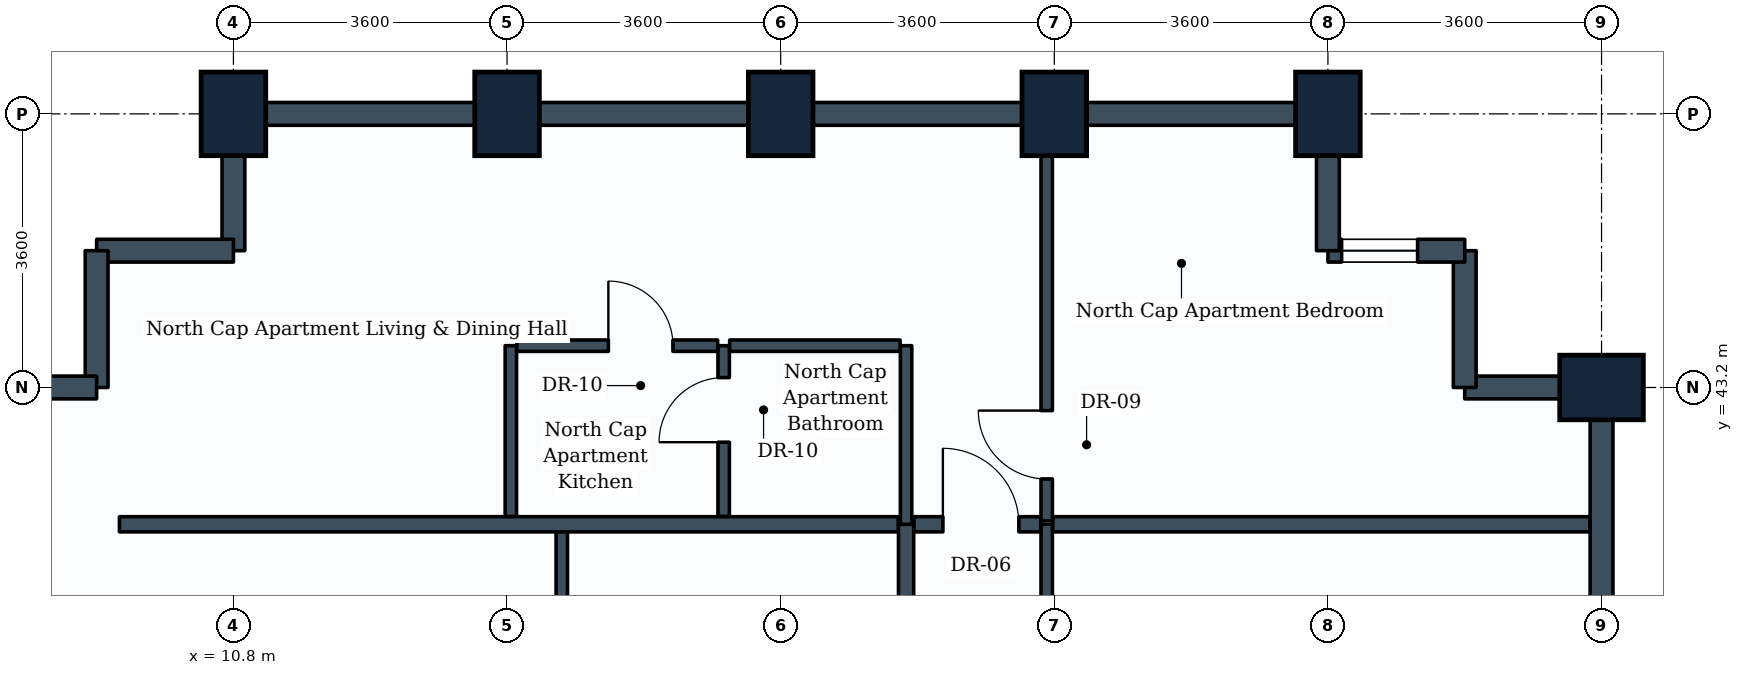
"""IFC4 building model, lengths in metres.
Left out: names, types, materials, properties, quantities, classifications, styles, units other than length and angle.
Written with IfcOpenShell. Run it as: python <this file> out.ifc"""

import sys

from ifc_helpers import new_model, si_unit, direction, frame, frame_2d, origin, origin_2d, place, context, subcontext, project, spatial, rectangle, extrude, element, fill, save


model = new_model("IFC4")
c1 = context("Model", 3, precision=1e-05, world=origin(), true_north=direction((0.0, 1.0)))
c2 = subcontext(c1, "Body", "Model", "MODEL_VIEW")
j1 = project(units=[si_unit("LENGTHUNIT", "METRE"), si_unit("PLANEANGLEUNIT", "RADIAN")], contexts=[c1])
p1 = place(None, origin())
s1 = spatial("IfcSite", under=j1, at=p1, CompositionType="ELEMENT")
p2 = place(p1, origin())
s2 = spatial("IfcBuilding", under=s1, at=p2, CompositionType="ELEMENT")
p3 = place(p2, frame((0.0, 0.0, 123.8)))
s3 = spatial("IfcBuildingStorey", under=s2, at=p3, CompositionType="ELEMENT", Elevation=123.8)
for number, where, z_axis, x_axis in (
    (1, (10.8, 46.8, 0.0), (0.0, 0.0, 1.0), (1.0, 0.0, 0.0)),
    (2, (14.4, 46.8, 0.0), (0.0, 0.0, 1.0), (1.0, 0.0, 0.0)),
    (3, (18.0, 46.8, 0.0), (0.0, 0.0, 1.0), (1.0, 0.0, 0.0)),
    (4, (21.6, 46.8, 0.0), (0.0, 0.0, 1.0), (1.0, 0.0, 0.0)),
    (5, (25.2, 46.8, 0.0), (0.0, 0.0, 1.0), (1.0, 0.0, 0.0)),
    (6, (28.8, 43.2, 0.0), (0.0, 0.0, 1.0), (0.0, 1.0, 0.0)),
):
    element("IfcColumn", number, at=place(p3, frame(where, z_axis=z_axis, x_axis=x_axis)), inside=s3, PredefinedType="COLUMN", context=c2, shape_type="SweptSolid", body=[
        extrude(rectangle(XDim=0.85, YDim=1.1, at=origin_2d()), origin(), (0.0, 0.0, 1.0), 3.8),
    ])
p4 = place(p3, frame((28.8, 43.2, 0.0), z_axis=(0.0, 0.0, 1.0), x_axis=(0.0, -1.0, 0.0)))
e7 = element("IfcWall", 7, at=p4, inside=s3, PredefinedType="STANDARD", context=c2, shape_type="SweptSolid", body=[
    extrude(rectangle(XDim=3.6, YDim=0.3, at=frame_2d((1.8, 0.0))), origin(), (0.0, 0.0, 1.0), 2.43),
])
for number, where, z_axis, x_axis in (
    (8, (27.0, 43.2, 0.0), (0.0, 0.0, 1.0), (1.0, 0.0, 0.0)),
    (9, (27.0, 43.2, 0.0), (0.0, 0.0, 1.0), (0.0, 1.0, 0.0)),
):
    element("IfcWall", number, at=place(p3, frame(where, z_axis=z_axis, x_axis=x_axis)), inside=s3, PredefinedType="STANDARD", context=c2, shape_type="SweptSolid", body=[
        extrude(rectangle(XDim=1.8, YDim=0.3, at=frame_2d((0.9, 0.0))), origin(), (0.0, 0.0, 1.0), 2.43),
    ])
p5 = place(p3, frame((25.2, 45.0, 0.0), z_axis=(0.0, 0.0, 1.0), x_axis=(1.0, 0.0, 0.0)))
e10 = element("IfcWall", 10, at=p5, inside=s3, PredefinedType="STANDARD", context=c2, shape_type="SweptSolid", body=[
    extrude(rectangle(XDim=1.8, YDim=0.3, at=frame_2d((0.9, 0.0))), origin(), (0.0, 0.0, 1.0), 3.465),
])
p6 = place(p5, frame((0.18, 0.0, 0.85)))
e11 = element("IfcOpeningElement", 11, at=p6, cuts=e10, PredefinedType="OPENING", context=c2, shape_type="SweptSolid", body=[
    extrude(rectangle(XDim=1.0, YDim=1.35, at=frame_2d((0.5, 0.675))), frame((0.0, 0.16, 0.0), z_axis=(0.0, -1.0, 0.0), x_axis=(1.0, 0.0, 0.0)), (0.0, 0.0, 1.0), 0.32),
])
p7 = place(p3, frame((25.2, 45.0, 0.0), z_axis=(0.0, 0.0, 1.0), x_axis=(0.0, 1.0, 0.0)))
e12 = element("IfcWall", 12, at=p7, inside=s3, PredefinedType="STANDARD", context=c2, shape_type="SweptSolid", body=[
    extrude(rectangle(XDim=1.8, YDim=0.3, at=frame_2d((0.9, 0.0))), origin(), (0.0, 0.0, 1.0), 2.43),
])
p8 = place(p3, frame((21.6, 46.8, 0.0), z_axis=(0.0, 0.0, 1.0), x_axis=(1.0, 0.0, 0.0)))
e13 = element("IfcWall", 13, at=p8, inside=s3, PredefinedType="STANDARD", context=c2, shape_type="SweptSolid", body=[
    extrude(rectangle(XDim=3.6, YDim=0.3, at=frame_2d((1.8, 0.0))), origin(), (0.0, 0.0, 1.0), 2.43),
])
for number, where, z_axis, x_axis in (
    (14, (18.0, 46.8, 0.0), (0.0, 0.0, 1.0), (1.0, 0.0, 0.0)),
    (15, (14.4, 46.8, 0.0), (0.0, 0.0, 1.0), (1.0, 0.0, 0.0)),
):
    element("IfcWall", number, at=place(p3, frame(where, z_axis=z_axis, x_axis=x_axis)), inside=s3, PredefinedType="STANDARD", context=c2, shape_type="SweptSolid", body=[
        extrude(rectangle(XDim=3.6, YDim=0.3, at=frame_2d((1.8, 0.0))), origin(), (0.0, 0.0, 1.0), 2.43),
    ])
p9 = place(p3, frame((10.8, 46.8, 0.0), z_axis=(0.0, 0.0, 1.0), x_axis=(1.0, 0.0, 0.0)))
e16 = element("IfcWall", 16, at=p9, inside=s3, PredefinedType="STANDARD", context=c2, shape_type="SweptSolid", body=[
    extrude(rectangle(XDim=3.6, YDim=0.3, at=frame_2d((1.8, 0.0))), origin(), (0.0, 0.0, 1.0), 2.43),
])
p10 = place(p3, frame((10.8, 45.0, 0.0), z_axis=(0.0, 0.0, 1.0), x_axis=(0.0, 1.0, 0.0)))
e17 = element("IfcWall", 17, at=p10, inside=s3, PredefinedType="STANDARD", context=c2, shape_type="SweptSolid", body=[
    extrude(rectangle(XDim=1.8, YDim=0.3, at=frame_2d((0.9, 0.0))), origin(), (0.0, 0.0, 1.0), 2.43),
])
p11 = place(p3, frame((9.0, 45.0, 0.0), z_axis=(0.0, 0.0, 1.0), x_axis=(1.0, 0.0, 0.0)))
e18 = element("IfcWall", 18, at=p11, inside=s3, PredefinedType="STANDARD", context=c2, shape_type="SweptSolid", body=[
    extrude(rectangle(XDim=1.8, YDim=0.3, at=frame_2d((0.9, 0.0))), origin(), (0.0, 0.0, 1.0), 3.465),
])
for number, where, z_axis, x_axis in (
    (19, (9.0, 43.2, 0.0), (0.0, 0.0, 1.0), (0.0, 1.0, 0.0)),
    (20, (7.2, 43.2, 0.0), (0.0, 0.0, 1.0), (1.0, 0.0, 0.0)),
):
    element("IfcWall", number, at=place(p3, frame(where, z_axis=z_axis, x_axis=x_axis)), inside=s3, PredefinedType="STANDARD", context=c2, shape_type="SweptSolid", body=[
        extrude(rectangle(XDim=1.8, YDim=0.3, at=frame_2d((0.9, 0.0))), origin(), (0.0, 0.0, 1.0), 2.43),
    ])
p12 = place(p3, frame((19.65, 36.65, 0.0), z_axis=(0.0, 0.0, 1.0), x_axis=(0.0, 1.0, 0.0)))
e21 = element("IfcWall", 21, at=p12, inside=s3, PredefinedType="PARTITIONING", context=c2, shape_type="SweptSolid", body=[
    extrude(rectangle(XDim=4.75, YDim=0.2, at=frame_2d((2.375, 0.0))), origin(), (0.0, 0.0, 1.0), 3.465),
])
p13 = place(p12, frame((0.44, 0.0, 0.0)))
e22 = element("IfcOpeningElement", 22, at=p13, cuts=e21, PredefinedType="OPENING", context=c2, shape_type="SweptSolid", body=[
    extrude(rectangle(XDim=1.0, YDim=2.1, at=frame_2d((0.5, 1.05))), frame((0.0, 0.11, 0.0), z_axis=(0.0, -1.0, 0.0), x_axis=(1.0, 0.0, 0.0)), (0.0, 0.0, 1.0), 0.22),
])
p14 = place(p3, frame((15.12, 36.85, 0.0), z_axis=(0.0, 0.0, 1.0), x_axis=(0.0, 1.0, 0.0)))
e23 = element("IfcWall", 23, at=p14, inside=s3, PredefinedType="PARTITIONING", context=c2, shape_type="SweptSolid", body=[
    extrude(rectangle(XDim=4.55, YDim=0.15, at=frame_2d((2.275, 0.0))), origin(), (0.0, 0.0, 1.0), 3.465),
])
p15 = place(p14, frame((0.439, 0.0, 0.0)))
e24 = element("IfcOpeningElement", 24, at=p15, cuts=e23, PredefinedType="OPENING", context=c2, shape_type="SweptSolid", body=[
    extrude(rectangle(XDim=0.9, YDim=2.1, at=frame_2d((0.45, 1.05))), frame((0.0, 0.085, 0.0), z_axis=(0.0, -1.0, 0.0), x_axis=(1.0, 0.0, 0.0)), (0.0, 0.0, 1.0), 0.17),
])
p16 = place(p3, frame((21.5, 26.879, 0.0), z_axis=(0.0, 0.0, 1.0), x_axis=(0.0, 1.0, 0.0)))
e25 = element("IfcWall", 25, at=p16, inside=s3, PredefinedType="PARTITIONING", context=c2, shape_type="SweptSolid", body=[
    extrude(rectangle(XDim=14.521, YDim=0.15, at=frame_2d((7.26, 0.0))), origin(), (0.0, 0.0, 1.0), 3.06),
])
p17 = place(p16, frame((6.681, 0.0, 0.0)))
e26 = element("IfcOpeningElement", 26, at=p17, cuts=e25, PredefinedType="OPENING", context=c2, shape_type="SweptSolid", body=[
    extrude(rectangle(XDim=1.0, YDim=2.1, at=frame_2d((0.5, 1.05))), frame((0.0, 0.085, 0.0), z_axis=(0.0, -1.0, 0.0), x_axis=(1.0, 0.0, 0.0)), (0.0, 0.0, 1.0), 0.17),
])
p18 = place(p3, frame((9.3, 41.4, 0.0), z_axis=(0.0, 0.0, 1.0), x_axis=(1.0, 0.0, 0.0)))
e27 = element("IfcWall", 27, at=p18, inside=s3, PredefinedType="PARTITIONING", context=c2, shape_type="SweptSolid", body=[
    extrude(rectangle(XDim=10.246, YDim=0.2, at=frame_2d((5.123, 0.0))), origin(), (0.0, 0.0, 1.0), 2.43),
])
p19 = place(p3, frame((21.579, 41.4, 0.0), z_axis=(0.0, 0.0, 1.0), x_axis=(1.0, 0.0, 0.0)))
e28 = element("IfcWall", 28, at=p19, inside=s3, PredefinedType="PARTITIONING", context=c2, shape_type="SweptSolid", body=[
    extrude(rectangle(XDim=7.067, YDim=0.2, at=frame_2d((3.533, 0.0))), origin(), (0.0, 0.0, 1.0), 3.465),
])
p20 = place(p3, frame((19.754, 41.4, 0.0), z_axis=(0.0, 0.0, 1.0), x_axis=(1.0, 0.0, 0.0)))
e29 = element("IfcWall", 29, at=p20, inside=s3, PredefinedType="PARTITIONING", context=c2, shape_type="SweptSolid", body=[
    extrude(rectangle(XDim=1.667, YDim=0.2, at=frame_2d((0.833, 0.0))), origin(), (0.0, 0.0, 1.0), 3.465),
])
p21 = place(p20, frame((0.38, 0.0, 0.0)))
e30 = element("IfcOpeningElement", 30, at=p21, cuts=e29, PredefinedType="OPENING", context=c2, shape_type="SweptSolid", body=[
    extrude(rectangle(XDim=1.0, YDim=2.1, at=frame_2d((0.5, 1.05))), frame((0.0, 0.11, 0.0), z_axis=(0.0, -1.0, 0.0), x_axis=(1.0, 0.0, 0.0)), (0.0, 0.0, 1.0), 0.22),
])
p22 = place(p3, frame((19.65, 41.4, 0.0), z_axis=(0.0, 0.0, 1.0), x_axis=(0.0, 1.0, 0.0)))
e31 = element("IfcWall", 31, at=p22, inside=s3, PredefinedType="PARTITIONING", context=c2, shape_type="SweptSolid", body=[
    extrude(rectangle(XDim=2.35, YDim=0.15, at=frame_2d((1.175, 0.0))), origin(), (0.0, 0.0, 1.0), 2.43),
])
p23 = place(p3, frame((17.25, 41.504, 0.0), z_axis=(0.0, 0.0, 1.0), x_axis=(0.0, 1.0, 0.0)))
e32 = element("IfcWall", 32, at=p23, inside=s3, PredefinedType="PARTITIONING", context=c2, shape_type="SweptSolid", body=[
    extrude(rectangle(XDim=2.246, YDim=0.15, at=frame_2d((1.123, 0.0))), origin(), (0.0, 0.0, 1.0), 2.43),
])
p24 = place(p23, frame((0.976, 0.0, 0.0)))
e33 = element("IfcOpeningElement", 33, at=p24, cuts=e32, PredefinedType="OPENING", context=c2, shape_type="SweptSolid", body=[
    extrude(rectangle(XDim=0.85, YDim=2.1, at=frame_2d((0.425, 1.05))), frame((0.0, 0.085, 0.0), z_axis=(0.0, -1.0, 0.0), x_axis=(1.0, 0.0, 0.0)), (0.0, 0.0, 1.0), 0.17),
])
p25 = place(p3, frame((17.329, 43.75, 0.0), z_axis=(0.0, 0.0, 1.0), x_axis=(1.0, 0.0, 0.0)))
e34 = element("IfcWall", 34, at=p25, inside=s3, PredefinedType="PARTITIONING", context=c2, shape_type="SweptSolid", body=[
    extrude(rectangle(XDim=2.242, YDim=0.15, at=frame_2d((1.121, 0.0))), origin(), (0.0, 0.0, 1.0), 2.43),
])
p26 = place(p3, frame((21.5, 41.446, 0.0), z_axis=(0.0, 0.0, 1.0), x_axis=(0.0, 1.0, 0.0)))
e35 = element("IfcWall", 35, at=p26, inside=s3, PredefinedType="PARTITIONING", context=c2, shape_type="SweptSolid", body=[
    extrude(rectangle(XDim=5.2, YDim=0.15, at=frame_2d((2.6, 0.0))), origin(), (0.0, 0.0, 1.0), 2.43),
])
p27 = place(p26, frame((0.55, 0.0, 0.0)))
e36 = element("IfcOpeningElement", 36, at=p27, cuts=e35, PredefinedType="OPENING", context=c2, shape_type="SweptSolid", body=[
    extrude(rectangle(XDim=0.9, YDim=2.1, at=frame_2d((0.45, 1.05))), frame((0.0, 0.085, 0.0), z_axis=(0.0, -1.0, 0.0), x_axis=(1.0, 0.0, 0.0)), (0.0, 0.0, 1.0), 0.17),
])
p28 = place(p3, frame((14.45, 41.504, 0.0), z_axis=(0.0, 0.0, 1.0), x_axis=(0.0, 1.0, 0.0)))
e37 = element("IfcWall", 37, at=p28, inside=s3, PredefinedType="PARTITIONING", context=c2, shape_type="SweptSolid", body=[
    extrude(rectangle(XDim=2.246, YDim=0.15, at=frame_2d((1.123, 0.0))), origin(), (0.0, 0.0, 1.0), 2.43),
])
p29 = place(p3, frame((14.529, 43.75, 0.0), z_axis=(0.0, 0.0, 1.0), x_axis=(1.0, 0.0, 0.0)))
e38 = element("IfcWall", 38, at=p29, inside=s3, PredefinedType="PARTITIONING", context=c2, shape_type="SweptSolid", body=[
    extrude(rectangle(XDim=2.642, YDim=0.15, at=frame_2d((1.321, 0.0))), origin(), (0.0, 0.0, 1.0), 2.43),
])
p30 = place(p29, frame((1.204, 0.0, 0.0)))
e39 = element("IfcOpeningElement", 39, at=p30, cuts=e38, PredefinedType="OPENING", context=c2, shape_type="SweptSolid", body=[
    extrude(rectangle(XDim=0.85, YDim=2.1, at=frame_2d((0.425, 1.05))), frame((0.0, 0.085, 0.0), z_axis=(0.0, -1.0, 0.0), x_axis=(1.0, 0.0, 0.0)), (0.0, 0.0, 1.0), 0.17),
])
p31 = place(p21, origin())
e40 = element("IfcDoor", 40, at=p31, inside=s3, OperationType="SINGLE_SWING_LEFT", PredefinedType="DOOR", context=c2, shape_type="SweptSolid", body=[
    extrude(rectangle(XDim=1.0, YDim=2.1, at=frame_2d((0.5, 1.05))), frame((0.0, 0.025, 0.0), z_axis=(0.0, -1.0, 0.0), x_axis=(1.0, 0.0, 0.0)), (0.0, 0.0, 1.0), 0.05),
])
fill(e30, e40)
p32 = place(p24, origin())
e41 = element("IfcDoor", 41, at=p32, inside=s3, OperationType="SINGLE_SWING_LEFT", PredefinedType="DOOR", context=c2, shape_type="SweptSolid", body=[
    extrude(rectangle(XDim=0.85, YDim=2.1, at=frame_2d((0.425, 1.05))), frame((0.0, 0.025, 0.0), z_axis=(0.0, -1.0, 0.0), x_axis=(1.0, 0.0, 0.0)), (0.0, 0.0, 1.0), 0.05),
])
fill(e33, e41)
p33 = place(p27, origin())
e42 = element("IfcDoor", 42, at=p33, inside=s3, OperationType="SINGLE_SWING_RIGHT", PredefinedType="DOOR", context=c2, shape_type="SweptSolid", body=[
    extrude(rectangle(XDim=0.9, YDim=2.1, at=frame_2d((0.45, 1.05))), frame((0.0, 0.025, 0.0), z_axis=(0.0, -1.0, 0.0), x_axis=(1.0, 0.0, 0.0)), (0.0, 0.0, 1.0), 0.05),
])
fill(e36, e42)
p34 = place(p30, origin())
e43 = element("IfcDoor", 43, at=p34, inside=s3, OperationType="SINGLE_SWING_LEFT", PredefinedType="DOOR", context=c2, shape_type="SweptSolid", body=[
    extrude(rectangle(XDim=0.85, YDim=2.1, at=frame_2d((0.425, 1.05))), frame((0.0, 0.025, 0.0), z_axis=(0.0, -1.0, 0.0), x_axis=(1.0, 0.0, 0.0)), (0.0, 0.0, 1.0), 0.05),
])
fill(e39, e43)
p35 = place(p6, origin())
e44 = element("IfcWindow", 44, at=p35, inside=s3, PartitioningType="SINGLE_PANEL", PredefinedType="WINDOW", context=c2, shape_type="SweptSolid", body=[
    extrude(rectangle(XDim=1.0, YDim=1.35, at=frame_2d((0.5, 0.675))), frame((0.0, 0.03, 0.0), z_axis=(0.0, -1.0, 0.0), x_axis=(1.0, 0.0, 0.0)), (0.0, 0.0, 1.0), 0.06),
])
fill(e11, e44)
save(model, sys.argv[1])
